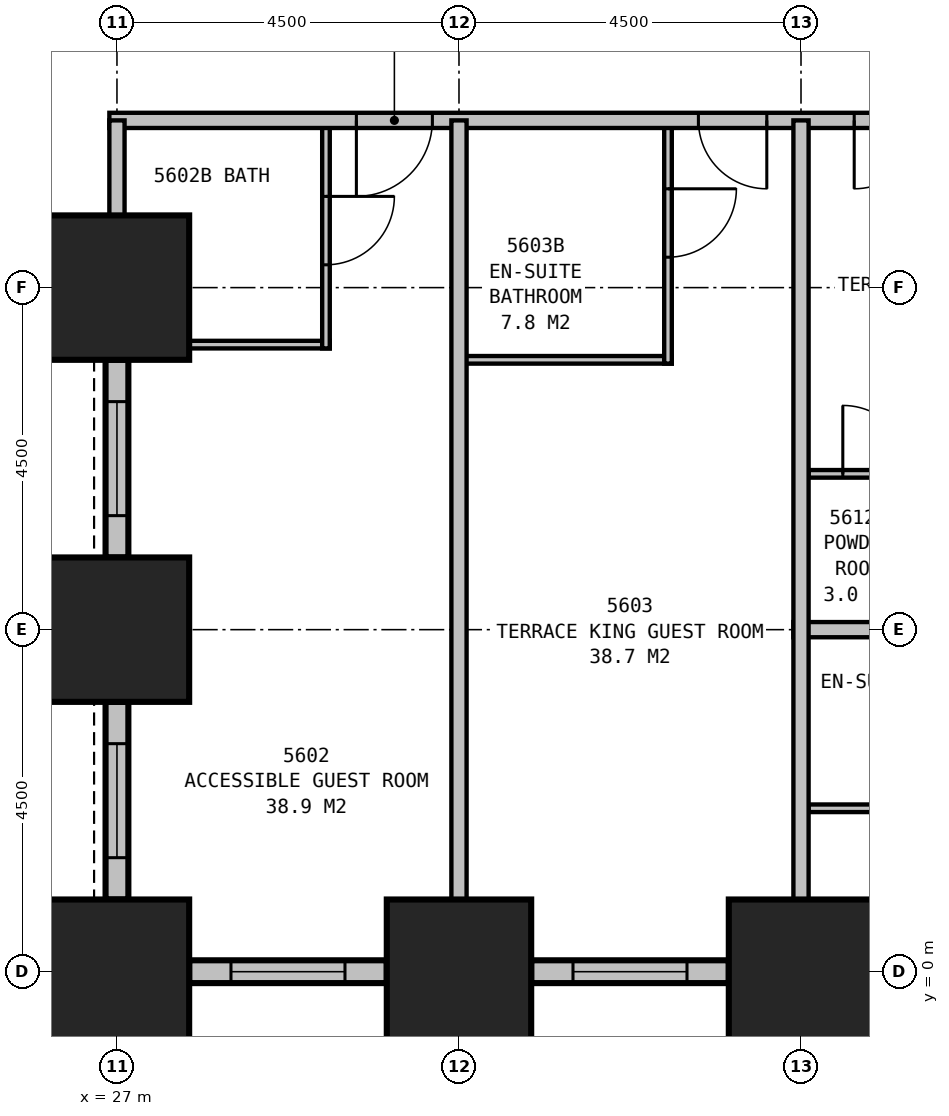
"""IFC4 building model, lengths in metres.
Left out: names, types, materials, properties, quantities, classifications, styles, units other than length and angle.
Written with IfcOpenShell. Run it as: python <this file> out.ifc"""

import sys

from ifc_helpers import new_model, si_unit, direction, frame, frame_2d, origin, origin_2d, place, context, subcontext, project, spatial, rectangle, extrude, element, fill, save


model = new_model("IFC4")
c1 = context("Model", 3, precision=1e-05, world=origin(), true_north=direction((0.0, 1.0)))
c2 = subcontext(c1, "Body", "Model", "MODEL_VIEW")
j1 = project(units=[si_unit("LENGTHUNIT", "METRE"), si_unit("PLANEANGLEUNIT", "RADIAN")], contexts=[c1])
p1 = place(None, origin())
s1 = spatial("IfcSite", under=j1, at=p1, CompositionType="ELEMENT")
p2 = place(p1, origin())
s2 = spatial("IfcBuilding", under=s1, at=p2, CompositionType="ELEMENT")
p3 = place(p2, frame((0.0, 0.0, 217.4)))
s3 = spatial("IfcBuildingStorey", under=s2, at=p3, CompositionType="ELEMENT", Elevation=217.4)
for number, where, z_axis, x_axis in (
    (1, (27.0, 9.0, 0.0), (0.0, 0.0, 1.0), (1.0, 0.0, 0.0)),
    (2, (27.0, 4.5, 0.0), (0.0, 0.0, 1.0), (1.0, 0.0, 0.0)),
    (3, (27.0, 0.0, 0.0), (0.0, 0.0, 1.0), (1.0, 0.0, 0.0)),
    (4, (31.5, 0.0, 0.0), (0.0, 0.0, 1.0), (1.0, 0.0, 0.0)),
    (5, (36.0, 0.0, 0.0), (0.0, 0.0, 1.0), (1.0, 0.0, 0.0)),
):
    element("IfcColumn", number, at=place(p3, frame(where, z_axis=z_axis, x_axis=x_axis)), inside=s3, PredefinedType="COLUMN", context=c2, shape_type="SweptSolid", body=[
        extrude(rectangle(XDim=1.9, YDim=1.9, at=origin_2d()), origin(), (0.0, 0.0, 1.0), 3.9),
    ])
p4 = place(p3, frame((27.0, 8.05, 0.0), z_axis=(0.0, 0.0, 1.0), x_axis=(0.0, -1.0, 0.0)))
e6 = element("IfcWall", 6, at=p4, inside=s3, PredefinedType="STANDARD", context=c2, shape_type="SweptSolid", body=[
    extrude(rectangle(XDim=2.6, YDim=0.3, at=frame_2d((1.3, 0.0))), origin(), (0.0, 0.0, 1.0), 2.15),
])
p5 = place(p4, frame((0.55, 0.0, 0.5)))
e7 = element("IfcOpeningElement", 7, at=p5, cuts=e6, PredefinedType="OPENING", context=c2, shape_type="SweptSolid", body=[
    extrude(rectangle(XDim=1.5, YDim=1.5, at=frame_2d((0.75, 0.75))), frame((0.0, 0.16, 0.0), z_axis=(0.0, -1.0, 0.0), x_axis=(1.0, 0.0, 0.0)), (0.0, 0.0, 1.0), 0.32),
])
p6 = place(p3, frame((27.0, 3.55, 0.0), z_axis=(0.0, 0.0, 1.0), x_axis=(0.0, -1.0, 0.0)))
e8 = element("IfcWall", 8, at=p6, inside=s3, PredefinedType="STANDARD", context=c2, shape_type="SweptSolid", body=[
    extrude(rectangle(XDim=2.6, YDim=0.3, at=frame_2d((1.3, 0.0))), origin(), (0.0, 0.0, 1.0), 2.15),
])
p7 = place(p6, frame((0.55, 0.0, 0.5)))
e9 = element("IfcOpeningElement", 9, at=p7, cuts=e8, PredefinedType="OPENING", context=c2, shape_type="SweptSolid", body=[
    extrude(rectangle(XDim=1.5, YDim=1.5, at=frame_2d((0.75, 0.75))), frame((0.0, 0.16, 0.0), z_axis=(0.0, -1.0, 0.0), x_axis=(1.0, 0.0, 0.0)), (0.0, 0.0, 1.0), 0.32),
])
p8 = place(p3, frame((27.95, 0.0, 0.0), z_axis=(0.0, 0.0, 1.0), x_axis=(1.0, 0.0, 0.0)))
e10 = element("IfcWall", 10, at=p8, inside=s3, PredefinedType="STANDARD", context=c2, shape_type="SweptSolid", body=[
    extrude(rectangle(XDim=2.6, YDim=0.3, at=frame_2d((1.3, 0.0))), origin(), (0.0, 0.0, 1.0), 2.15),
])
p9 = place(p8, frame((0.55, 0.0, 0.5)))
e11 = element("IfcOpeningElement", 11, at=p9, cuts=e10, PredefinedType="OPENING", context=c2, shape_type="SweptSolid", body=[
    extrude(rectangle(XDim=1.5, YDim=1.5, at=frame_2d((0.75, 0.75))), frame((0.0, 0.16, 0.0), z_axis=(0.0, -1.0, 0.0), x_axis=(1.0, 0.0, 0.0)), (0.0, 0.0, 1.0), 0.32),
])
p10 = place(p3, frame((32.45, 0.0, 0.0), z_axis=(0.0, 0.0, 1.0), x_axis=(1.0, 0.0, 0.0)))
e12 = element("IfcWall", 12, at=p10, inside=s3, PredefinedType="STANDARD", context=c2, shape_type="SweptSolid", body=[
    extrude(rectangle(XDim=2.6, YDim=0.3, at=frame_2d((1.3, 0.0))), origin(), (0.0, 0.0, 1.0), 2.15),
])
p11 = place(p10, frame((0.55, 0.0, 0.5)))
e13 = element("IfcOpeningElement", 13, at=p11, cuts=e12, PredefinedType="OPENING", context=c2, shape_type="SweptSolid", body=[
    extrude(rectangle(XDim=1.5, YDim=1.5, at=frame_2d((0.75, 0.75))), frame((0.0, 0.16, 0.0), z_axis=(0.0, -1.0, 0.0), x_axis=(1.0, 0.0, 0.0)), (0.0, 0.0, 1.0), 0.32),
])
p12 = place(p3, frame((26.9, 11.2, 0.0), z_axis=(0.0, 0.0, 1.0), x_axis=(1.0, 0.0, 0.0)))
e14 = element("IfcWall", 14, at=p12, inside=s3, PredefinedType="PARTITIONING", context=c2, shape_type="SweptSolid", body=[
    extrude(rectangle(XDim=11.4, YDim=0.2, at=frame_2d((5.7, 0.0))), origin(), (0.0, 0.0, 1.0), 3.65),
])
p13 = place(p12, frame((4.25, 0.0, 0.0), z_axis=(0.0, 0.0, 1.0), x_axis=(-1.0, 0.0, 0.0)))
e15 = element("IfcOpeningElement", 15, at=p13, cuts=e14, PredefinedType="OPENING", context=c2, shape_type="SweptSolid", body=[
    extrude(rectangle(XDim=1.0, YDim=2.1, at=frame_2d((0.5, 1.05))), frame((0.0, 0.11, 0.0), z_axis=(0.0, -1.0, 0.0), x_axis=(1.0, 0.0, 0.0)), (0.0, 0.0, 1.0), 0.22),
])
p14 = place(p12, frame((8.65, 0.0, 0.0), z_axis=(0.0, 0.0, 1.0), x_axis=(-1.0, 0.0, 0.0)))
e16 = element("IfcOpeningElement", 16, at=p14, cuts=e14, PredefinedType="OPENING", context=c2, shape_type="SweptSolid", body=[
    extrude(rectangle(XDim=0.9, YDim=2.1, at=frame_2d((0.45, 1.05))), frame((0.0, 0.11, 0.0), z_axis=(0.0, -1.0, 0.0), x_axis=(1.0, 0.0, 0.0)), (0.0, 0.0, 1.0), 0.22),
])
p15 = place(p12, frame((10.7, 0.0, 0.0), z_axis=(0.0, 0.0, 1.0), x_axis=(-1.0, 0.0, 0.0)))
e17 = element("IfcOpeningElement", 17, at=p15, cuts=e14, PredefinedType="OPENING", context=c2, shape_type="SweptSolid", body=[
    extrude(rectangle(XDim=0.9, YDim=2.1, at=frame_2d((0.45, 1.05))), frame((0.0, 0.11, 0.0), z_axis=(0.0, -1.0, 0.0), x_axis=(1.0, 0.0, 0.0)), (0.0, 0.0, 1.0), 0.22),
])
p16 = place(p3, frame((27.0, 11.2, 0.0), z_axis=(0.0, 0.0, 1.0), x_axis=(0.0, -1.0, 0.0)))
e18 = element("IfcWall", 18, at=p16, inside=s3, PredefinedType="PARTITIONING", context=c2, shape_type="SweptSolid", body=[
    extrude(rectangle(XDim=2.2, YDim=0.2, at=frame_2d((1.1, 0.0))), origin(), (0.0, 0.0, 1.0), 2.65),
])
p17 = place(p3, frame((31.5, 11.2, 0.0), z_axis=(0.0, 0.0, 1.0), x_axis=(0.0, -1.0, 0.0)))
e19 = element("IfcWall", 19, at=p17, inside=s3, PredefinedType="PARTITIONING", context=c2, shape_type="SweptSolid", body=[
    extrude(rectangle(XDim=11.2, YDim=0.2, at=frame_2d((5.6, 0.0))), origin(), (0.0, 0.0, 1.0), 2.65),
])
p18 = place(p3, frame((27.0, 8.25, 0.0), z_axis=(0.0, 0.0, 1.0), x_axis=(1.0, 0.0, 0.0)))
e20 = element("IfcWall", 20, at=p18, inside=s3, PredefinedType="PLUMBINGWALL", context=c2, shape_type="SweptSolid", body=[
    extrude(rectangle(XDim=2.8, YDim=0.1, at=frame_2d((1.4, 0.0))), origin(), (0.0, 0.0, 1.0), 3.65),
])
p19 = place(p3, frame((29.75, 11.2, 0.0), z_axis=(0.0, 0.0, 1.0), x_axis=(0.0, -1.0, 0.0)))
e21 = element("IfcWall", 21, at=p19, inside=s3, PredefinedType="PLUMBINGWALL", context=c2, shape_type="SweptSolid", body=[
    extrude(rectangle(XDim=3.0, YDim=0.1, at=frame_2d((1.5, 0.0))), origin(), (0.0, 0.0, 1.0), 3.65),
])
p20 = place(p19, frame((1.0, 0.0, 0.0)))
e22 = element("IfcOpeningElement", 22, at=p20, cuts=e21, PredefinedType="OPENING", context=c2, shape_type="SweptSolid", body=[
    extrude(rectangle(XDim=0.9, YDim=2.1, at=frame_2d((0.45, 1.05))), frame((0.0, 0.06, 0.0), z_axis=(0.0, -1.0, 0.0), x_axis=(1.0, 0.0, 0.0)), (0.0, 0.0, 1.0), 0.12),
])
p21 = place(p3, frame((31.5, 8.05, 0.0), z_axis=(0.0, 0.0, 1.0), x_axis=(1.0, 0.0, 0.0)))
e23 = element("IfcWall", 23, at=p21, inside=s3, PredefinedType="PLUMBINGWALL", context=c2, shape_type="SweptSolid", body=[
    extrude(rectangle(XDim=2.8, YDim=0.1, at=frame_2d((1.4, 0.0))), origin(), (0.0, 0.0, 1.0), 3.65),
])
p22 = place(p3, frame((34.25, 11.2, 0.0), z_axis=(0.0, 0.0, 1.0), x_axis=(0.0, -1.0, 0.0)))
e24 = element("IfcWall", 24, at=p22, inside=s3, PredefinedType="PLUMBINGWALL", context=c2, shape_type="SweptSolid", body=[
    extrude(rectangle(XDim=3.2, YDim=0.1, at=frame_2d((1.6, 0.0))), origin(), (0.0, 0.0, 1.0), 3.65),
])
p23 = place(p22, frame((0.9, 0.0, 0.0)))
e25 = element("IfcOpeningElement", 25, at=p23, cuts=e24, PredefinedType="OPENING", context=c2, shape_type="SweptSolid", body=[
    extrude(rectangle(XDim=0.9, YDim=2.1, at=frame_2d((0.45, 1.05))), frame((0.0, 0.06, 0.0), z_axis=(0.0, -1.0, 0.0), x_axis=(1.0, 0.0, 0.0)), (0.0, 0.0, 1.0), 0.12),
])
p24 = place(p3, frame((36.0, 11.2, 0.0), z_axis=(0.0, 0.0, 1.0), x_axis=(0.0, -1.0, 0.0)))
e26 = element("IfcWall", 26, at=p24, inside=s3, PredefinedType="PARTITIONING", context=c2, shape_type="SweptSolid", body=[
    extrude(rectangle(XDim=11.2, YDim=0.2, at=frame_2d((5.6, 0.0))), origin(), (0.0, 0.0, 1.0), 2.65),
])
p25 = place(p3, frame((35.9, 4.5, 0.0), z_axis=(0.0, 0.0, 1.0), x_axis=(1.0, 0.0, 0.0)))
e27 = element("IfcWall", 27, at=p25, inside=s3, PredefinedType="PARTITIONING", context=c2, shape_type="SweptSolid", body=[
    extrude(rectangle(XDim=9.1, YDim=0.2, at=frame_2d((4.55, 0.0))), origin(), (0.0, 0.0, 1.0), 3.65),
])
p26 = place(p25, frame((7.1, 0.0, 0.0)))
e28 = element("IfcOpeningElement", 28, at=p26, cuts=e27, PredefinedType="OPENING", context=c2, shape_type="SweptSolid", body=[
    extrude(rectangle(XDim=0.9, YDim=2.1, at=frame_2d((0.45, 1.05))), frame((0.0, 0.11, 0.0), z_axis=(0.0, -1.0, 0.0), x_axis=(1.0, 0.0, 0.0)), (0.0, 0.0, 1.0), 0.22),
])
p27 = place(p3, frame((36.1, 6.55, 0.0), z_axis=(0.0, 0.0, 1.0), x_axis=(1.0, 0.0, 0.0)))
e29 = element("IfcWall", 29, at=p27, inside=s3, PredefinedType="PLUMBINGWALL", context=c2, shape_type="SweptSolid", body=[
    extrude(rectangle(XDim=1.8, YDim=0.1, at=frame_2d((0.9, 0.0))), origin(), (0.0, 0.0, 1.0), 3.65),
])
p28 = place(p27, frame((0.45, 0.0, 0.0)))
e30 = element("IfcOpeningElement", 30, at=p28, cuts=e29, PredefinedType="OPENING", context=c2, shape_type="SweptSolid", body=[
    extrude(rectangle(XDim=0.9, YDim=2.1, at=frame_2d((0.45, 1.05))), frame((0.0, 0.06, 0.0), z_axis=(0.0, -1.0, 0.0), x_axis=(1.0, 0.0, 0.0)), (0.0, 0.0, 1.0), 0.12),
])
p29 = place(p3, frame((36.1, 2.15, 0.0), z_axis=(0.0, 0.0, 1.0), x_axis=(1.0, 0.0, 0.0)))
e31 = element("IfcWall", 31, at=p29, inside=s3, PredefinedType="PLUMBINGWALL", context=c2, shape_type="SweptSolid", body=[
    extrude(rectangle(XDim=3.5, YDim=0.1, at=frame_2d((1.75, 0.0))), origin(), (0.0, 0.0, 1.0), 3.65),
])
p30 = place(p29, frame((1.8, 0.0, 0.0), z_axis=(0.0, 0.0, 1.0), x_axis=(-1.0, 0.0, 0.0)))
e32 = element("IfcOpeningElement", 32, at=p30, cuts=e31, PredefinedType="OPENING", context=c2, shape_type="SweptSolid", body=[
    extrude(rectangle(XDim=0.9, YDim=2.1, at=frame_2d((0.45, 1.05))), frame((0.0, 0.06, 0.0), z_axis=(0.0, -1.0, 0.0), x_axis=(1.0, 0.0, 0.0)), (0.0, 0.0, 1.0), 0.12),
])
p31 = place(p5, origin())
e33 = element("IfcWindow", 33, at=p31, inside=s3, PartitioningType="SINGLE_PANEL", PredefinedType="WINDOW", context=c2, shape_type="SweptSolid", body=[
    extrude(rectangle(XDim=1.5, YDim=1.5, at=frame_2d((0.75, 0.75))), frame((0.0, 0.03, 0.0), z_axis=(0.0, -1.0, 0.0), x_axis=(1.0, 0.0, 0.0)), (0.0, 0.0, 1.0), 0.06),
])
fill(e7, e33)
p32 = place(p7, origin())
e34 = element("IfcWindow", 34, at=p32, inside=s3, PartitioningType="SINGLE_PANEL", PredefinedType="WINDOW", context=c2, shape_type="SweptSolid", body=[
    extrude(rectangle(XDim=1.5, YDim=1.5, at=frame_2d((0.75, 0.75))), frame((0.0, 0.03, 0.0), z_axis=(0.0, -1.0, 0.0), x_axis=(1.0, 0.0, 0.0)), (0.0, 0.0, 1.0), 0.06),
])
fill(e9, e34)
p33 = place(p9, origin())
e35 = element("IfcWindow", 35, at=p33, inside=s3, PartitioningType="SINGLE_PANEL", PredefinedType="WINDOW", context=c2, shape_type="SweptSolid", body=[
    extrude(rectangle(XDim=1.5, YDim=1.5, at=frame_2d((0.75, 0.75))), frame((0.0, 0.03, 0.0), z_axis=(0.0, -1.0, 0.0), x_axis=(1.0, 0.0, 0.0)), (0.0, 0.0, 1.0), 0.06),
])
fill(e11, e35)
p34 = place(p11, origin())
e36 = element("IfcWindow", 36, at=p34, inside=s3, PartitioningType="SINGLE_PANEL", PredefinedType="WINDOW", context=c2, shape_type="SweptSolid", body=[
    extrude(rectangle(XDim=1.5, YDim=1.5, at=frame_2d((0.75, 0.75))), frame((0.0, 0.03, 0.0), z_axis=(0.0, -1.0, 0.0), x_axis=(1.0, 0.0, 0.0)), (0.0, 0.0, 1.0), 0.06),
])
fill(e13, e36)
p35 = place(p13, origin())
e37 = element("IfcDoor", 37, at=p35, inside=s3, OperationType="SINGLE_SWING_RIGHT", PredefinedType="DOOR", context=c2, shape_type="SweptSolid", body=[
    extrude(rectangle(XDim=1.0, YDim=2.1, at=frame_2d((0.5, 1.05))), frame((0.0, 0.025, 0.0), z_axis=(0.0, -1.0, 0.0), x_axis=(1.0, 0.0, 0.0)), (0.0, 0.0, 1.0), 0.05),
])
fill(e15, e37)
p36 = place(p14, origin())
e38 = element("IfcDoor", 38, at=p36, inside=s3, OperationType="SINGLE_SWING_LEFT", PredefinedType="DOOR", context=c2, shape_type="SweptSolid", body=[
    extrude(rectangle(XDim=0.9, YDim=2.1, at=frame_2d((0.45, 1.05))), frame((0.0, 0.025, 0.0), z_axis=(0.0, -1.0, 0.0), x_axis=(1.0, 0.0, 0.0)), (0.0, 0.0, 1.0), 0.05),
])
fill(e16, e38)
p37 = place(p15, origin())
e39 = element("IfcDoor", 39, at=p37, inside=s3, OperationType="SINGLE_SWING_RIGHT", PredefinedType="DOOR", context=c2, shape_type="SweptSolid", body=[
    extrude(rectangle(XDim=0.9, YDim=2.1, at=frame_2d((0.45, 1.05))), frame((0.0, 0.025, 0.0), z_axis=(0.0, -1.0, 0.0), x_axis=(1.0, 0.0, 0.0)), (0.0, 0.0, 1.0), 0.05),
])
fill(e17, e39)
p38 = place(p20, origin())
e40 = element("IfcDoor", 40, at=p38, inside=s3, OperationType="SINGLE_SWING_LEFT", PredefinedType="DOOR", context=c2, shape_type="SweptSolid", body=[
    extrude(rectangle(XDim=0.9, YDim=2.1, at=frame_2d((0.45, 1.05))), frame((0.0, 0.025, 0.0), z_axis=(0.0, -1.0, 0.0), x_axis=(1.0, 0.0, 0.0)), (0.0, 0.0, 1.0), 0.05),
])
fill(e22, e40)
p39 = place(p23, origin())
e41 = element("IfcDoor", 41, at=p39, inside=s3, OperationType="SINGLE_SWING_LEFT", PredefinedType="DOOR", context=c2, shape_type="SweptSolid", body=[
    extrude(rectangle(XDim=0.9, YDim=2.1, at=frame_2d((0.45, 1.05))), frame((0.0, 0.025, 0.0), z_axis=(0.0, -1.0, 0.0), x_axis=(1.0, 0.0, 0.0)), (0.0, 0.0, 1.0), 0.05),
])
fill(e25, e41)
p40 = place(p28, origin())
e42 = element("IfcDoor", 42, at=p40, inside=s3, OperationType="SINGLE_SWING_LEFT", PredefinedType="DOOR", context=c2, shape_type="SweptSolid", body=[
    extrude(rectangle(XDim=0.9, YDim=2.1, at=frame_2d((0.45, 1.05))), frame((0.0, 0.025, 0.0), z_axis=(0.0, -1.0, 0.0), x_axis=(1.0, 0.0, 0.0)), (0.0, 0.0, 1.0), 0.05),
])
fill(e30, e42)
save(model, sys.argv[1])
